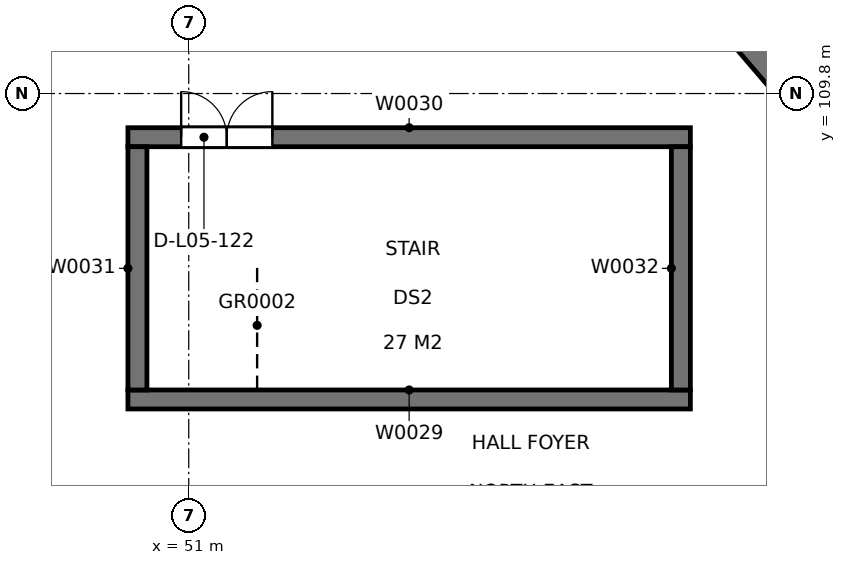
"""IFC4 building model, lengths in metres.
Left out: names, types, materials, properties, quantities, classifications, styles, units other than length and angle.
Written with IfcOpenShell. Run it as: python <this file> out.ifc"""

import sys

from ifc_helpers import new_model, si_unit, direction, frame, frame_2d, origin, place, context, subcontext, project, spatial, rectangle, extrude, element, fill, save


model = new_model("IFC4")
c1 = context("Model", 3, precision=1e-05, world=origin(), true_north=direction((0.0, 1.0)))
c2 = subcontext(c1, "Body", "Model", "MODEL_VIEW")
j1 = project(units=[si_unit("LENGTHUNIT", "METRE"), si_unit("PLANEANGLEUNIT", "RADIAN")], contexts=[c1])
p1 = place(None, origin())
s1 = spatial("IfcSite", under=j1, at=p1, CompositionType="ELEMENT")
p2 = place(p1, origin())
s2 = spatial("IfcBuilding", under=s1, at=p2, CompositionType="ELEMENT")
p3 = place(p2, frame((0.0, 0.0, 24.0)))
s3 = spatial("IfcBuildingStorey", under=s2, at=p3, CompositionType="ELEMENT", Elevation=24.0)
p4 = place(p3, frame((59.15, 109.67, 0.0), z_axis=(0.0, 0.0, 1.0), x_axis=(-0.650526940133, 0.759483179643, 0.0)))
e1 = element("IfcWall", 1, at=p4, inside=s3, PredefinedType="SOLIDWALL", context=c2, shape_type="SweptSolid", body=[
    extrude(rectangle(XDim=2.433, YDim=0.5, at=frame_2d((1.217, 0.0))), origin(), (0.0, 0.0, 1.0), 3.6),
])
p5 = place(p3, frame((50.2, 105.775, 0.0), z_axis=(0.0, 0.0, 1.0), x_axis=(1.0, 0.0, 0.0)))
e2 = element("IfcWall", 2, at=p5, inside=s3, PredefinedType="SOLIDWALL", context=c2, shape_type="SweptSolid", body=[
    extrude(rectangle(XDim=7.4, YDim=0.25, at=frame_2d((3.7, 0.0))), origin(), (0.0, 0.0, 1.0), 4.8),
])
p6 = place(p3, frame((50.2, 109.225, 0.0), z_axis=(0.0, 0.0, 1.0), x_axis=(1.0, 0.0, 0.0)))
e3 = element("IfcWall", 3, at=p6, inside=s3, PredefinedType="SOLIDWALL", context=c2, shape_type="SweptSolid", body=[
    extrude(rectangle(XDim=7.4, YDim=0.25, at=frame_2d((3.7, 0.0))), origin(), (0.0, 0.0, 1.0), 4.8),
])
p7 = place(p6, frame((0.7, 0.0, 0.0)))
e4 = element("IfcOpeningElement", 4, at=p7, cuts=e3, PredefinedType="OPENING", context=c2, shape_type="SweptSolid", body=[
    extrude(rectangle(XDim=1.2, YDim=2.1, at=frame_2d((0.6, 1.05))), frame((0.0, 0.135, 0.0), z_axis=(0.0, -1.0, 0.0), x_axis=(1.0, 0.0, 0.0)), (0.0, 0.0, 1.0), 0.27),
])
for number, where, z_axis, x_axis in (
    (5, (50.325, 105.9, 0.0), (0.0, 0.0, 1.0), (0.0, 1.0, 0.0)),
    (6, (57.475, 105.9, 0.0), (0.0, 0.0, 1.0), (0.0, 1.0, 0.0)),
):
    element("IfcWall", number, at=place(p3, frame(where, z_axis=z_axis, x_axis=x_axis)), inside=s3, PredefinedType="SOLIDWALL", context=c2, shape_type="SweptSolid", body=[
        extrude(rectangle(XDim=3.2, YDim=0.25, at=frame_2d((1.6, 0.0))), origin(), (0.0, 0.0, 1.0), 4.8),
    ])
p8 = place(p7, origin())
e7 = element("IfcDoor", 7, at=p8, inside=s3, OperationType="DOUBLE_DOOR_SINGLE_SWING", PredefinedType="DOOR", context=c2, shape_type="SweptSolid", body=[
    extrude(rectangle(XDim=1.2, YDim=2.1, at=frame_2d((0.6, 1.05))), frame((0.0, 0.025, 0.0), z_axis=(0.0, -1.0, 0.0), x_axis=(1.0, 0.0, 0.0)), (0.0, 0.0, 1.0), 0.05),
])
fill(e4, e7)
save(model, sys.argv[1])
